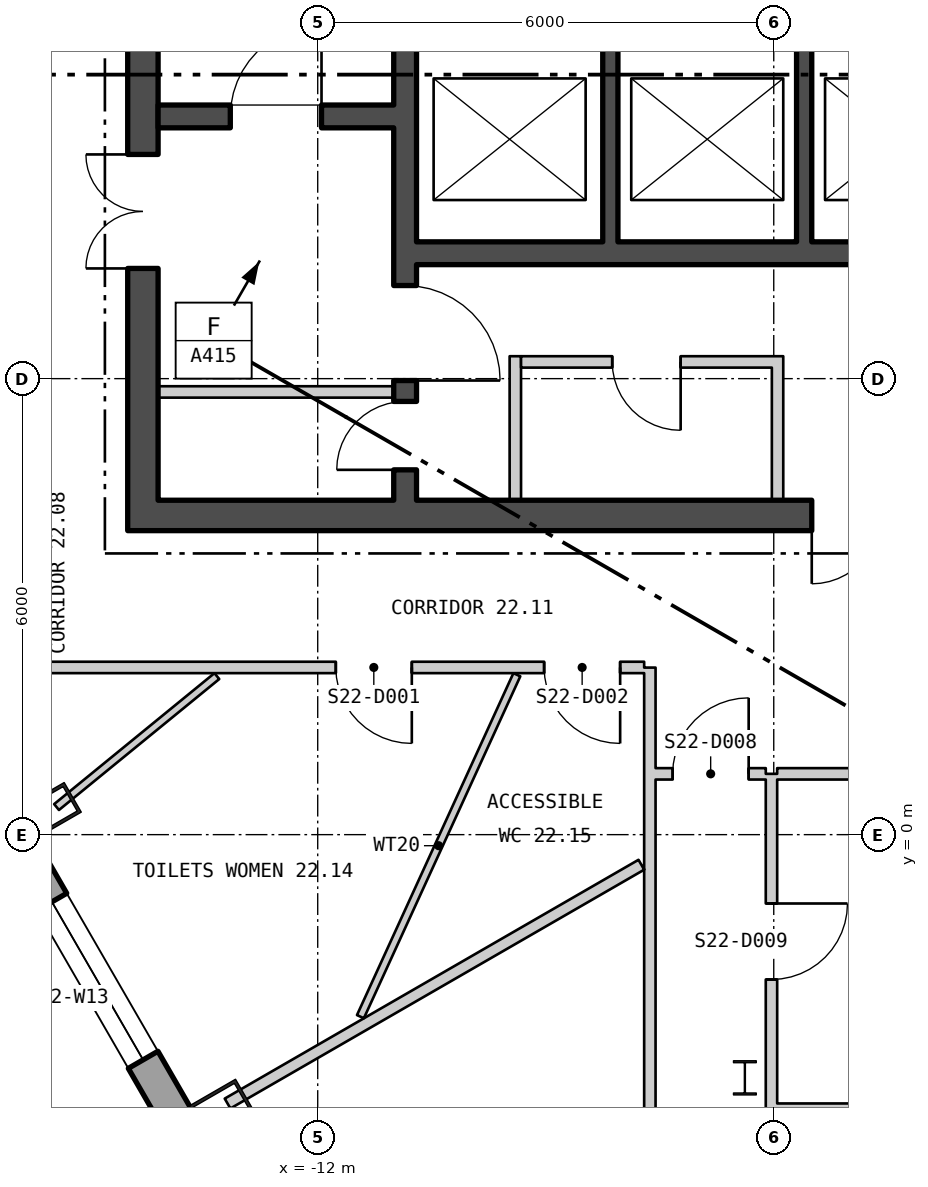
"""IFC4 building model, lengths in metres.
Left out: names, types, materials, properties, quantities, classifications, styles, units other than length and angle.
Written with IfcOpenShell. Run it as: python <this file> out.ifc"""

import sys

from ifc_helpers import new_model, si_unit, direction, frame, frame_2d, origin, origin_2d, place, context, subcontext, project, spatial, polyline, rectangle, hollow_rectangle, i_section, outline, extrude, element, fill, save


model = new_model("IFC4")
c1 = context("Model", 3, precision=1e-05, world=origin(), true_north=direction((0.0, 1.0)))
c2 = subcontext(c1, "Body", "Model", "MODEL_VIEW")
j1 = project(units=[si_unit("LENGTHUNIT", "METRE"), si_unit("PLANEANGLEUNIT", "RADIAN")], contexts=[c1])
p1 = place(None, origin())
s1 = spatial("IfcSite", under=j1, at=p1, CompositionType="ELEMENT")
p2 = place(p1, origin())
s2 = spatial("IfcBuilding", under=s1, at=p2, CompositionType="ELEMENT")
p3 = place(p2, frame((0.0, 0.0, 298.2)))
s3 = spatial("IfcBuildingStorey", under=s2, at=p3, CompositionType="ELEMENT", Elevation=298.2)
for number, where, z_axis, x_axis in (
    (1, (-15.526, 0.316, 0.0), (0.0, 0.0, 1.0), (0.5, -0.866, 0.0)),
    (2, (-13.272, -3.588, 0.0), (0.0, 0.0, 1.0), (0.5, -0.866, 0.0)),
):
    element("IfcColumn", number, at=place(p3, frame(where, z_axis=z_axis, x_axis=x_axis)), inside=s3, PredefinedType="COLUMN", context=c2, shape_type="SweptSolid", body=[
        extrude(hollow_rectangle(XDim=0.45, YDim=0.7, WallThickness=0.04, at=origin_2d()), origin(), (0.0, 0.0, 1.0), 6.0),
    ])
p4 = place(p3, frame((-6.38, -3.2, 0.0), z_axis=(0.0, 0.0, 1.0), x_axis=(1.0, 0.0, 0.0)))
e3 = element("IfcColumn", 3, at=p4, inside=s3, PredefinedType="COLUMN", context=c2, shape_type="SweptSolid", body=[
    extrude(i_section(OverallWidth=0.3, OverallDepth=0.45, WebThickness=0.014, FlangeThickness=0.026, at=origin_2d()), origin(), (0.0, 0.0, 1.0), 6.0),
])
p5 = place(p3, frame((-25.205, 15.931, -0.28), z_axis=(0.0, 0.0, 1.0), x_axis=(0.499999764979, -0.866025539474, 0.0)))
e4 = element("IfcWall", 4, at=p5, inside=s3, PredefinedType="SOLIDWALL", context=c2, shape_type="SweptSolid", body=[
    extrude(outline(polyline([(-0.13, -0.225), (45.87, -0.225), (45.61, 0.225), (0.13, 0.225), (-0.13, -0.225)])), origin(), (0.0, 0.0, 1.0), 6.1),
])
p6 = place(p5, frame((1.424, 0.0, 1.18)))
e5 = element("IfcOpeningElement", 5, at=p6, cuts=e4, PredefinedType="OPENING", context=c2, shape_type="SweptSolid", body=[
    extrude(rectangle(XDim=2.4, YDim=4.1, at=frame_2d((1.2, 2.05))), frame((0.0, 0.235, 0.0), z_axis=(0.0, -1.0, 0.0), x_axis=(1.0, 0.0, 0.0)), (0.0, 0.0, 1.0), 0.47),
])
p7 = place(p5, frame((5.893, 0.0, 1.18)))
e6 = element("IfcOpeningElement", 6, at=p7, cuts=e4, PredefinedType="OPENING", context=c2, shape_type="SweptSolid", body=[
    extrude(rectangle(XDim=2.4, YDim=4.1, at=frame_2d((1.2, 2.05))), frame((0.0, 0.235, 0.0), z_axis=(0.0, -1.0, 0.0), x_axis=(1.0, 0.0, 0.0)), (0.0, 0.0, 1.0), 0.47),
])
p8 = place(p5, frame((10.401, 0.0, 1.18)))
e7 = element("IfcOpeningElement", 7, at=p8, cuts=e4, PredefinedType="OPENING", context=c2, shape_type="SweptSolid", body=[
    extrude(rectangle(XDim=2.4, YDim=4.1, at=frame_2d((1.2, 2.05))), frame((0.0, 0.235, 0.0), z_axis=(0.0, -1.0, 0.0), x_axis=(1.0, 0.0, 0.0)), (0.0, 0.0, 1.0), 0.47),
])
p9 = place(p5, frame((14.909, 0.0, 1.18)))
e8 = element("IfcOpeningElement", 8, at=p9, cuts=e4, PredefinedType="OPENING", context=c2, shape_type="SweptSolid", body=[
    extrude(rectangle(XDim=2.4, YDim=4.1, at=frame_2d((1.2, 2.05))), frame((0.0, 0.235, 0.0), z_axis=(0.0, -1.0, 0.0), x_axis=(1.0, 0.0, 0.0)), (0.0, 0.0, 1.0), 0.47),
])
p10 = place(p5, frame((19.416, 0.0, 1.18)))
e9 = element("IfcOpeningElement", 9, at=p10, cuts=e4, PredefinedType="OPENING", context=c2, shape_type="SweptSolid", body=[
    extrude(rectangle(XDim=2.4, YDim=4.1, at=frame_2d((1.2, 2.05))), frame((0.0, 0.235, 0.0), z_axis=(0.0, -1.0, 0.0), x_axis=(1.0, 0.0, 0.0)), (0.0, 0.0, 1.0), 0.47),
])
p11 = place(p5, frame((23.924, 0.0, 1.18)))
e10 = element("IfcOpeningElement", 10, at=p11, cuts=e4, PredefinedType="OPENING", context=c2, shape_type="SweptSolid", body=[
    extrude(rectangle(XDim=2.4, YDim=4.1, at=frame_2d((1.2, 2.05))), frame((0.0, 0.235, 0.0), z_axis=(0.0, -1.0, 0.0), x_axis=(1.0, 0.0, 0.0)), (0.0, 0.0, 1.0), 0.47),
])
p12 = place(p5, frame((28.431, 0.0, 1.18)))
e11 = element("IfcOpeningElement", 11, at=p12, cuts=e4, PredefinedType="OPENING", context=c2, shape_type="SweptSolid", body=[
    extrude(rectangle(XDim=2.4, YDim=4.1, at=frame_2d((1.2, 2.05))), frame((0.0, 0.235, 0.0), z_axis=(0.0, -1.0, 0.0), x_axis=(1.0, 0.0, 0.0)), (0.0, 0.0, 1.0), 0.47),
])
p13 = place(p5, frame((32.939, 0.0, 1.18)))
e12 = element("IfcOpeningElement", 12, at=p13, cuts=e4, PredefinedType="OPENING", context=c2, shape_type="SweptSolid", body=[
    extrude(rectangle(XDim=2.4, YDim=4.1, at=frame_2d((1.2, 2.05))), frame((0.0, 0.235, 0.0), z_axis=(0.0, -1.0, 0.0), x_axis=(1.0, 0.0, 0.0)), (0.0, 0.0, 1.0), 0.47),
])
p14 = place(p5, frame((37.447, 0.0, 1.18)))
e13 = element("IfcOpeningElement", 13, at=p14, cuts=e4, PredefinedType="OPENING", context=c2, shape_type="SweptSolid", body=[
    extrude(rectangle(XDim=2.4, YDim=4.1, at=frame_2d((1.2, 2.05))), frame((0.0, 0.235, 0.0), z_axis=(0.0, -1.0, 0.0), x_axis=(1.0, 0.0, 0.0)), (0.0, 0.0, 1.0), 0.47),
])
p15 = place(p5, frame((41.916, 0.0, 1.18)))
e14 = element("IfcOpeningElement", 14, at=p15, cuts=e4, PredefinedType="OPENING", context=c2, shape_type="SweptSolid", body=[
    extrude(rectangle(XDim=2.4, YDim=4.1, at=frame_2d((1.2, 2.05))), frame((0.0, 0.235, 0.0), z_axis=(0.0, -1.0, 0.0), x_axis=(1.0, 0.0, 0.0)), (0.0, 0.0, 1.0), 0.47),
])
p16 = place(p3, frame((-14.5, 4.2, 0.0), z_axis=(0.0, 0.0, 1.0), x_axis=(1.0, 0.0, 0.0)))
e15 = element("IfcWall", 15, at=p16, inside=s3, PredefinedType="SHEAR", context=c2, shape_type="SweptSolid", body=[
    extrude(rectangle(XDim=29.0, YDim=0.4, at=frame_2d((14.5, 0.0))), origin(), (0.0, 0.0, 1.0), 5.8),
])
p17 = place(p16, frame((9.0, 0.0, 0.0)))
e16 = element("IfcOpeningElement", 16, at=p17, cuts=e15, PredefinedType="OPENING", context=c2, shape_type="SweptSolid", body=[
    extrude(rectangle(XDim=1.8, YDim=2.4, at=frame_2d((0.9, 1.2))), frame((0.0, 0.21, 0.0), z_axis=(0.0, -1.0, 0.0), x_axis=(1.0, 0.0, 0.0)), (0.0, 0.0, 1.0), 0.42),
])
p18 = place(p16, frame((19.0, 0.0, 0.0)))
e17 = element("IfcOpeningElement", 17, at=p18, cuts=e15, PredefinedType="OPENING", context=c2, shape_type="SweptSolid", body=[
    extrude(rectangle(XDim=1.8, YDim=2.4, at=frame_2d((0.9, 1.2))), frame((0.0, 0.21, 0.0), z_axis=(0.0, -1.0, 0.0), x_axis=(1.0, 0.0, 0.0)), (0.0, 0.0, 1.0), 0.42),
])
p19 = place(p3, frame((-14.3, 4.4, 0.0), z_axis=(0.0, 0.0, 1.0), x_axis=(0.0, 1.0, 0.0)))
e18 = element("IfcWall", 18, at=p19, inside=s3, PredefinedType="SHEAR", context=c2, shape_type="SweptSolid", body=[
    extrude(rectangle(XDim=13.2, YDim=0.4, at=frame_2d((6.6, 0.0))), origin(), (0.0, 0.0, 1.0), 5.8),
])
p20 = place(p19, frame((3.05, 0.0, 0.0)))
e19 = element("IfcOpeningElement", 19, at=p20, cuts=e18, PredefinedType="OPENING", context=c2, shape_type="SweptSolid", body=[
    extrude(rectangle(XDim=1.5, YDim=2.1, at=frame_2d((0.75, 1.05))), frame((0.0, 0.21, 0.0), z_axis=(0.0, -1.0, 0.0), x_axis=(1.0, 0.0, 0.0)), (0.0, 0.0, 1.0), 0.42),
])
p21 = place(p3, frame((-10.85, 4.4, 0.0), z_axis=(0.0, 0.0, 1.0), x_axis=(0.0, 1.0, 0.0)))
e20 = element("IfcWall", 20, at=p21, inside=s3, PredefinedType="SHEAR", context=c2, shape_type="SweptSolid", body=[
    extrude(rectangle(XDim=13.2, YDim=0.3, at=frame_2d((6.6, 0.0))), origin(), (0.0, 0.0, 1.0), 5.8),
])
p22 = place(p21, frame((1.575, 0.0, 0.0)))
e21 = element("IfcOpeningElement", 21, at=p22, cuts=e20, PredefinedType="OPENING", context=c2, shape_type="SweptSolid", body=[
    extrude(rectangle(XDim=1.25, YDim=2.1, at=frame_2d((0.625, 1.05))), frame((0.0, 0.16, 0.0), z_axis=(0.0, -1.0, 0.0), x_axis=(1.0, 0.0, 0.0)), (0.0, 0.0, 1.0), 0.32),
])
p23 = place(p21, frame((0.4, 0.0, 0.0)))
e22 = element("IfcOpeningElement", 22, at=p23, cuts=e20, PredefinedType="OPENING", context=c2, shape_type="SweptSolid", body=[
    extrude(rectangle(XDim=0.9, YDim=2.1, at=frame_2d((0.45, 1.05))), frame((0.0, 0.16, 0.0), z_axis=(0.0, -1.0, 0.0), x_axis=(1.0, 0.0, 0.0)), (0.0, 0.0, 1.0), 0.32),
])
p24 = place(p3, frame((-14.1, 9.45, 0.0), z_axis=(0.0, 0.0, 1.0), x_axis=(1.0, 0.0, 0.0)))
e23 = element("IfcWall", 23, at=p24, inside=s3, PredefinedType="SHEAR", context=c2, shape_type="SweptSolid", body=[
    extrude(rectangle(XDim=3.1, YDim=0.3, at=frame_2d((1.55, 0.0))), origin(), (0.0, 0.0, 1.0), 5.8),
])
p25 = place(p24, frame((0.95, 0.0, 0.0)))
e24 = element("IfcOpeningElement", 24, at=p25, cuts=e23, PredefinedType="OPENING", context=c2, shape_type="SweptSolid", body=[
    extrude(rectangle(XDim=1.2, YDim=2.1, at=frame_2d((0.6, 1.05))), frame((0.0, 0.16, 0.0), z_axis=(0.0, -1.0, 0.0), x_axis=(1.0, 0.0, 0.0)), (0.0, 0.0, 1.0), 0.32),
])
p26 = place(p3, frame((-10.7, 7.65, 0.0), z_axis=(0.0, 0.0, 1.0), x_axis=(1.0, 0.0, 0.0)))
e25 = element("IfcWall", 25, at=p26, inside=s3, PredefinedType="SHEAR", context=c2, shape_type="SweptSolid", body=[
    extrude(rectangle(XDim=10.3, YDim=0.3, at=frame_2d((5.15, 0.0))), origin(), (0.0, 0.0, 1.0), 5.8),
])
for number, where, z_axis, x_axis in (
    (26, (-8.15, 7.8, 0.0), (0.0, 0.0, 1.0), (0.0, 1.0, 0.0)),
    (27, (-5.6, 7.8, 0.0), (0.0, 0.0, 1.0), (0.0, 1.0, 0.0)),
):
    element("IfcWall", number, at=place(p3, frame(where, z_axis=z_axis, x_axis=x_axis)), inside=s3, PredefinedType="SHEAR", context=c2, shape_type="SweptSolid", body=[
        extrude(rectangle(XDim=2.7, YDim=0.2, at=frame_2d((1.35, 0.0))), origin(), (0.0, 0.0, 1.0), 5.8),
    ])
p27 = place(p3, frame((-14.1, 5.825, 0.0), z_axis=(0.0, 0.0, 1.0), x_axis=(1.0, 0.0, 0.0)))
e28 = element("IfcWall", 28, at=p27, inside=s3, PredefinedType="PARTITIONING", context=c2, shape_type="SweptSolid", body=[
    extrude(rectangle(XDim=3.1, YDim=0.15, at=frame_2d((1.55, 0.0))), origin(), (0.0, 0.0, 1.0), 5.8),
])
for number, where, z_axis, x_axis in (
    (29, (-9.4, 4.4, 0.0), (0.0, 0.0, 1.0), (0.0, 1.0, 0.0)),
    (30, (-5.95, 4.4, 0.0), (0.0, 0.0, 1.0), (0.0, 1.0, 0.0)),
):
    element("IfcWall", number, at=place(p3, frame(where, z_axis=z_axis, x_axis=x_axis)), inside=s3, PredefinedType="PARTITIONING", context=c2, shape_type="SweptSolid", body=[
        extrude(rectangle(XDim=1.895, YDim=0.15, at=frame_2d((0.948, 0.0))), origin(), (0.0, 0.0, 1.0), 5.8),
    ])
p28 = place(p3, frame((-9.325, 6.22, 0.0), z_axis=(0.0, 0.0, 1.0), x_axis=(1.0, 0.0, 0.0)))
e31 = element("IfcWall", 31, at=p28, inside=s3, PredefinedType="PARTITIONING", context=c2, shape_type="SweptSolid", body=[
    extrude(rectangle(XDim=3.3, YDim=0.15, at=frame_2d((1.65, 0.0))), origin(), (0.0, 0.0, 1.0), 5.8),
])
p29 = place(p28, frame((1.2, 0.0, 0.0)))
e32 = element("IfcOpeningElement", 32, at=p29, cuts=e31, PredefinedType="OPENING", context=c2, shape_type="SweptSolid", body=[
    extrude(rectangle(XDim=0.9, YDim=2.1, at=frame_2d((0.45, 1.05))), frame((0.0, 0.085, 0.0), z_axis=(0.0, -1.0, 0.0), x_axis=(1.0, 0.0, 0.0)), (0.0, 0.0, 1.0), 0.17),
])
p30 = place(p3, frame((-16.375, 2.2, 0.0), z_axis=(0.0, 0.0, 1.0), x_axis=(1.0, 0.0, 0.0)))
e33 = element("IfcWall", 33, at=p30, inside=s3, PredefinedType="PARTITIONING", context=c2, shape_type="SweptSolid", body=[
    extrude(rectangle(XDim=8.67, YDim=0.15, at=frame_2d((4.335, 0.0))), origin(), (0.0, 0.0, 1.0), 5.8),
])
p31 = place(p30, frame((4.613, 0.0, 0.0)))
e34 = element("IfcOpeningElement", 34, at=p31, cuts=e33, PredefinedType="OPENING", context=c2, shape_type="SweptSolid", body=[
    extrude(rectangle(XDim=1.0, YDim=2.1, at=frame_2d((0.5, 1.05))), frame((0.0, 0.085, 0.0), z_axis=(0.0, -1.0, 0.0), x_axis=(1.0, 0.0, 0.0)), (0.0, 0.0, 1.0), 0.17),
])
p32 = place(p30, frame((7.354, 0.0, 0.0)))
e35 = element("IfcOpeningElement", 35, at=p32, cuts=e33, PredefinedType="OPENING", context=c2, shape_type="SweptSolid", body=[
    extrude(rectangle(XDim=1.0, YDim=2.1, at=frame_2d((0.5, 1.05))), frame((0.0, 0.085, 0.0), z_axis=(0.0, -1.0, 0.0), x_axis=(1.0, 0.0, 0.0)), (0.0, 0.0, 1.0), 0.17),
])
p33 = place(p3, frame((-15.436, 0.363, 0.0), z_axis=(0.0, 0.0, 1.0), x_axis=(0.774415182093, 0.632677742412, 0.0)))
e36 = element("IfcWall", 36, at=p33, inside=s3, PredefinedType="PARTITIONING", context=c2, shape_type="SweptSolid", body=[
    extrude(rectangle(XDim=2.723, YDim=0.1, at=frame_2d((1.362, 0.0))), origin(), (0.0, 0.0, 1.0), 5.8),
])
p34 = place(p3, frame((-13.186, -3.538, 0.0), z_axis=(0.0, 0.0, 1.0), x_axis=(0.866100818307, 0.499869355459, 0.0)))
e37 = element("IfcWall", 37, at=p34, inside=s3, PredefinedType="PARTITIONING", context=c2, shape_type="SweptSolid", body=[
    extrude(rectangle(XDim=6.286, YDim=0.15, at=frame_2d((3.143, 0.0))), origin(), (0.0, 0.0, 1.0), 5.8),
])
p35 = place(p3, frame((-11.438, -2.395, 0.0), z_axis=(0.0, 0.0, 1.0), x_axis=(0.415979482181, 0.909373999191, 0.0)))
e38 = element("IfcWall", 38, at=p35, inside=s3, PredefinedType="PARTITIONING", context=c2, shape_type="SweptSolid", body=[
    extrude(rectangle(XDim=4.947, YDim=0.1, at=frame_2d((2.474, 0.0))), origin(), (0.0, 0.0, 1.0), 5.8),
])
p36 = place(p3, frame((-7.63, -13.675, 0.0), z_axis=(0.0, 0.0, 1.0), x_axis=(0.0, 1.0, 0.0)))
e39 = element("IfcWall", 39, at=p36, inside=s3, PredefinedType="PARTITIONING", context=c2, shape_type="SweptSolid", body=[
    extrude(rectangle(XDim=15.873, YDim=0.15, at=frame_2d((7.936, 0.0))), origin(), (0.0, 0.0, 1.0), 5.8),
])
p37 = place(p3, frame((-7.555, 0.8, 0.0), z_axis=(0.0, 0.0, 1.0), x_axis=(1.0, 0.0, 0.0)))
e40 = element("IfcWall", 40, at=p37, inside=s3, PredefinedType="PARTITIONING", context=c2, shape_type="SweptSolid", body=[
    extrude(rectangle(XDim=1.45, YDim=0.15, at=frame_2d((0.725, 0.0))), origin(), (0.0, 0.0, 1.0), 5.8),
])
p38 = place(p37, frame((0.225, 0.0, 0.0)))
e41 = element("IfcOpeningElement", 41, at=p38, cuts=e40, PredefinedType="OPENING", context=c2, shape_type="SweptSolid", body=[
    extrude(rectangle(XDim=1.0, YDim=2.1, at=frame_2d((0.5, 1.05))), frame((0.0, 0.085, 0.0), z_axis=(0.0, -1.0, 0.0), x_axis=(1.0, 0.0, 0.0)), (0.0, 0.0, 1.0), 0.17),
])
p39 = place(p3, frame((-6.03, -3.687, 0.0), z_axis=(0.0, 0.0, 1.0), x_axis=(0.0, 1.0, 0.0)))
e42 = element("IfcWall", 42, at=p39, inside=s3, PredefinedType="PARTITIONING", context=c2, shape_type="SweptSolid", body=[
    extrude(rectangle(XDim=4.487, YDim=0.15, at=frame_2d((2.244, 0.0))), origin(), (0.0, 0.0, 1.0), 5.8),
])
p40 = place(p39, frame((1.781, 0.0, 0.0)))
e43 = element("IfcOpeningElement", 43, at=p40, cuts=e42, PredefinedType="OPENING", context=c2, shape_type="SweptSolid", body=[
    extrude(rectangle(XDim=1.0, YDim=2.1, at=frame_2d((0.5, 1.05))), frame((0.0, 0.085, 0.0), z_axis=(0.0, -1.0, 0.0), x_axis=(1.0, 0.0, 0.0)), (0.0, 0.0, 1.0), 0.17),
])
p41 = place(p3, frame((-5.955, -3.612, 0.0), z_axis=(0.0, 0.0, 1.0), x_axis=(1.0, 0.0, 0.0)))
e44 = element("IfcWall", 44, at=p41, inside=s3, PredefinedType="PARTITIONING", context=c2, shape_type="SweptSolid", body=[
    extrude(rectangle(XDim=1.605, YDim=0.15, at=frame_2d((0.802, 0.0))), origin(), (0.0, 0.0, 1.0), 5.8),
])
p42 = place(p3, frame((-5.955, 0.8, 0.0), z_axis=(0.0, 0.0, 1.0), x_axis=(1.0, 0.0, 0.0)))
e45 = element("IfcWall", 45, at=p42, inside=s3, PredefinedType="PARTITIONING", context=c2, shape_type="SweptSolid", body=[
    extrude(rectangle(XDim=1.65, YDim=0.15, at=frame_2d((0.825, 0.0))), origin(), (0.0, 0.0, 1.0), 5.8),
])
p43 = place(p10, origin())
e46 = element("IfcWindow", 46, at=p43, inside=s3, PartitioningType="SINGLE_PANEL", PredefinedType="WINDOW", context=c2, shape_type="SweptSolid", body=[
    extrude(rectangle(XDim=2.4, YDim=4.1, at=frame_2d((1.2, 2.05))), frame((0.0, 0.105, 0.0), z_axis=(0.0, -1.0, 0.0), x_axis=(1.0, 0.0, 0.0)), (0.0, 0.0, 1.0), 0.06),
])
fill(e9, e46)
p44 = place(p25, origin())
e47 = element("IfcDoor", 47, at=p44, inside=s3, OperationType="SINGLE_SWING_LEFT", PredefinedType="DOOR", context=c2, shape_type="SweptSolid", body=[
    extrude(rectangle(XDim=1.2, YDim=2.1, at=frame_2d((0.6, 1.05))), frame((0.0, 0.025, 0.0), z_axis=(0.0, -1.0, 0.0), x_axis=(1.0, 0.0, 0.0)), (0.0, 0.0, 1.0), 0.05),
])
fill(e24, e47)
p45 = place(p22, origin())
e48 = element("IfcDoor", 48, at=p45, inside=s3, OperationType="SINGLE_SWING_LEFT", PredefinedType="DOOR", context=c2, shape_type="SweptSolid", body=[
    extrude(rectangle(XDim=1.25, YDim=2.1, at=frame_2d((0.625, 1.05))), frame((0.0, 0.025, 0.0), z_axis=(0.0, -1.0, 0.0), x_axis=(1.0, 0.0, 0.0)), (0.0, 0.0, 1.0), 0.05),
])
fill(e21, e48)
p46 = place(p20, origin())
e49 = element("IfcDoor", 49, at=p46, inside=s3, OperationType="DOUBLE_DOOR_SINGLE_SWING", PredefinedType="DOOR", context=c2, shape_type="SweptSolid", body=[
    extrude(rectangle(XDim=1.5, YDim=2.1, at=frame_2d((0.75, 1.05))), frame((0.0, 0.025, 0.0), z_axis=(0.0, -1.0, 0.0), x_axis=(1.0, 0.0, 0.0)), (0.0, 0.0, 1.0), 0.05),
])
fill(e19, e49)
p47 = place(p23, origin())
e50 = element("IfcDoor", 50, at=p47, inside=s3, OperationType="SINGLE_SWING_RIGHT", PredefinedType="DOOR", context=c2, shape_type="SweptSolid", body=[
    extrude(rectangle(XDim=0.9, YDim=2.1, at=frame_2d((0.45, 1.05))), frame((0.0, 0.025, 0.0), z_axis=(0.0, -1.0, 0.0), x_axis=(1.0, 0.0, 0.0)), (0.0, 0.0, 1.0), 0.05),
])
fill(e22, e50)
p48 = place(p29, origin())
e51 = element("IfcDoor", 51, at=p48, inside=s3, OperationType="SINGLE_SWING_RIGHT", PredefinedType="DOOR", context=c2, shape_type="SweptSolid", body=[
    extrude(rectangle(XDim=0.9, YDim=2.1, at=frame_2d((0.45, 1.05))), frame((0.0, 0.025, 0.0), z_axis=(0.0, -1.0, 0.0), x_axis=(1.0, 0.0, 0.0)), (0.0, 0.0, 1.0), 0.05),
])
fill(e32, e51)
p49 = place(p17, origin())
e52 = element("IfcDoor", 52, at=p49, inside=s3, OperationType="DOUBLE_DOOR_SINGLE_SWING", PredefinedType="DOOR", context=c2, shape_type="SweptSolid", body=[
    extrude(rectangle(XDim=1.8, YDim=2.4, at=frame_2d((0.9, 1.2))), frame((0.0, 0.025, 0.0), z_axis=(0.0, -1.0, 0.0), x_axis=(1.0, 0.0, 0.0)), (0.0, 0.0, 1.0), 0.05),
])
fill(e16, e52)
p50 = place(p31, origin())
e53 = element("IfcDoor", 53, at=p50, inside=s3, OperationType="SINGLE_SWING_RIGHT", PredefinedType="DOOR", context=c2, shape_type="SweptSolid", body=[
    extrude(rectangle(XDim=1.0, YDim=2.1, at=frame_2d((0.5, 1.05))), frame((0.0, 0.025, 0.0), z_axis=(0.0, -1.0, 0.0), x_axis=(1.0, 0.0, 0.0)), (0.0, 0.0, 1.0), 0.05),
])
fill(e34, e53)
p51 = place(p32, origin())
e54 = element("IfcDoor", 54, at=p51, inside=s3, OperationType="SINGLE_SWING_RIGHT", PredefinedType="DOOR", context=c2, shape_type="SweptSolid", body=[
    extrude(rectangle(XDim=1.0, YDim=2.1, at=frame_2d((0.5, 1.05))), frame((0.0, 0.025, 0.0), z_axis=(0.0, -1.0, 0.0), x_axis=(1.0, 0.0, 0.0)), (0.0, 0.0, 1.0), 0.05),
])
fill(e35, e54)
p52 = place(p38, origin())
e55 = element("IfcDoor", 55, at=p52, inside=s3, OperationType="SINGLE_SWING_LEFT", PredefinedType="DOOR", context=c2, shape_type="SweptSolid", body=[
    extrude(rectangle(XDim=1.0, YDim=2.1, at=frame_2d((0.5, 1.05))), frame((0.0, 0.025, 0.0), z_axis=(0.0, -1.0, 0.0), x_axis=(1.0, 0.0, 0.0)), (0.0, 0.0, 1.0), 0.05),
])
fill(e41, e55)
p53 = place(p40, origin())
e56 = element("IfcDoor", 56, at=p53, inside=s3, OperationType="SINGLE_SWING_RIGHT", PredefinedType="DOOR", context=c2, shape_type="SweptSolid", body=[
    extrude(rectangle(XDim=1.0, YDim=2.1, at=frame_2d((0.5, 1.05))), frame((0.0, 0.025, 0.0), z_axis=(0.0, -1.0, 0.0), x_axis=(1.0, 0.0, 0.0)), (0.0, 0.0, 1.0), 0.05),
])
fill(e43, e56)
save(model, sys.argv[1])
